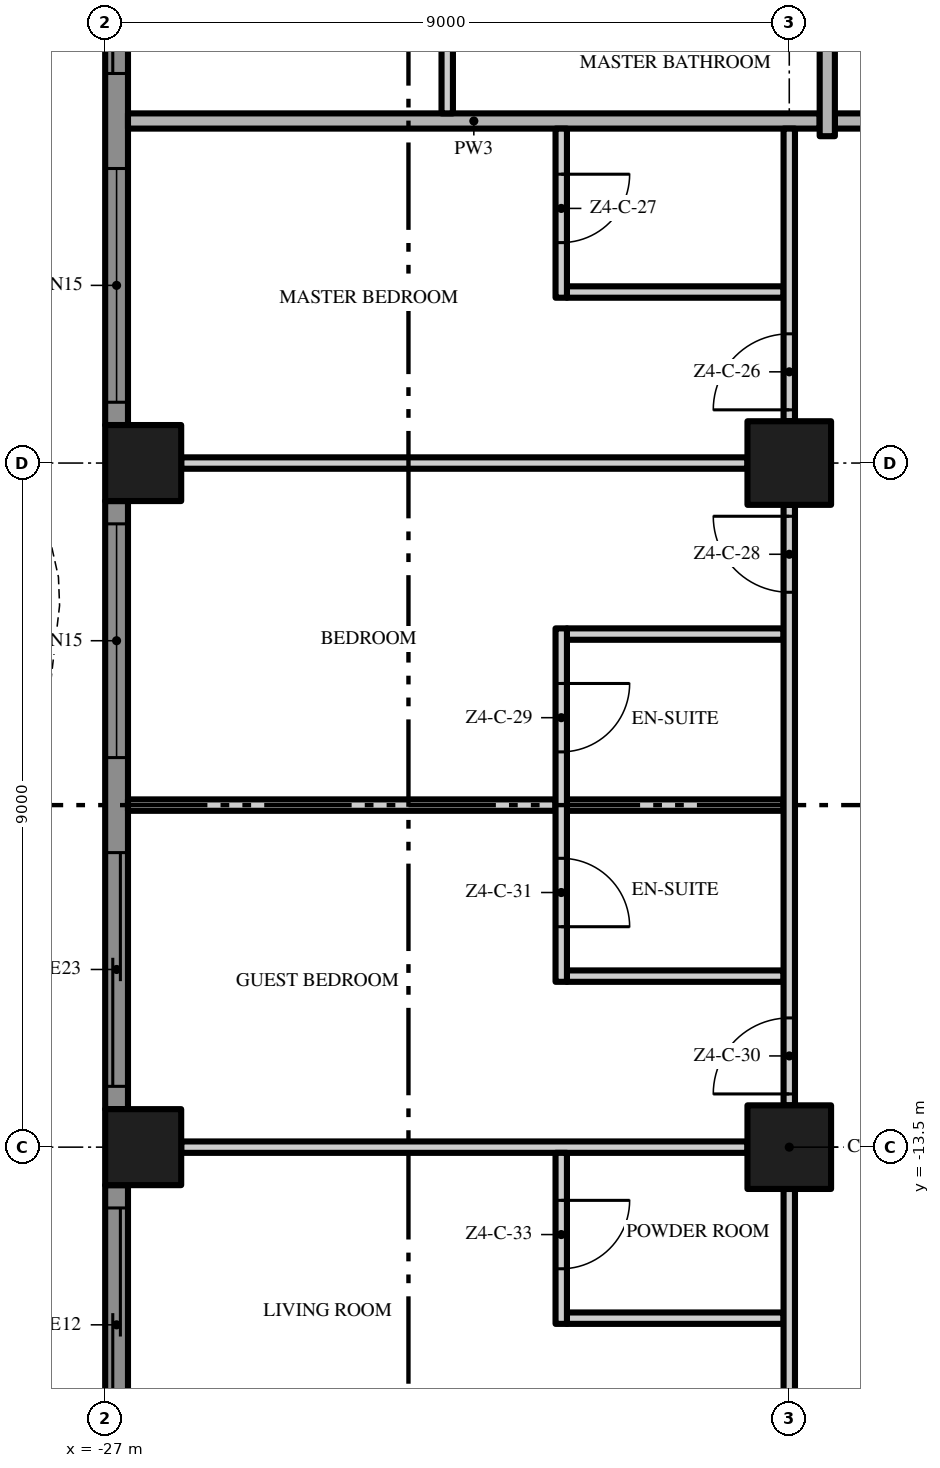
"""IFC4 building model, lengths in metres.
Left out: names, types, materials, properties, quantities, classifications, styles, units other than length and angle.
Written with IfcOpenShell. Run it as: python <this file> out.ifc"""

import sys

from ifc_helpers import new_model, si_unit, direction, frame, frame_2d, origin, origin_2d, place, context, subcontext, project, spatial, polyline, rectangle, outline, extrude, element, fill, save


model = new_model("IFC4")
c1 = context("Model", 3, precision=1e-05, world=origin(), true_north=direction((0.0, 1.0)))
c2 = subcontext(c1, "Body", "Model", "MODEL_VIEW")
j1 = project(units=[si_unit("LENGTHUNIT", "METRE"), si_unit("PLANEANGLEUNIT", "RADIAN")], contexts=[c1])
p1 = place(None, origin())
s1 = spatial("IfcSite", under=j1, at=p1, CompositionType="ELEMENT")
p2 = place(p1, origin())
s2 = spatial("IfcBuilding", under=s1, at=p2, CompositionType="ELEMENT")
p3 = place(p2, frame((0.0, 0.0, 214.8)))
s3 = spatial("IfcBuildingStorey", under=s2, at=p3, CompositionType="ELEMENT", Elevation=214.8)
for number, where, z_axis, x_axis in (
    (1, (-18.0, -13.5, 0.0), (0.0, 0.0, 1.0), (1.0, 0.0, 0.0)),
    (2, (-18.0, -4.5, 0.0), (0.0, 0.0, 1.0), (1.0, 0.0, 0.0)),
):
    element("IfcColumn", number, at=place(p3, frame(where, z_axis=z_axis, x_axis=x_axis)), inside=s3, PredefinedType="COLUMN", context=c2, shape_type="SweptSolid", body=[
        extrude(rectangle(XDim=1.1, YDim=1.1, at=origin_2d()), origin(), (0.0, 0.0, 1.0), 3.5),
    ])
for number, where, z_axis, x_axis in (
    (3, (-26.5, -13.5, 0.0), (0.0, 0.0, 1.0), (1.0, 0.0, 0.0)),
    (4, (-26.5, -4.5, 0.0), (0.0, 0.0, 1.0), (1.0, 0.0, 0.0)),
):
    element("IfcColumn", number, at=place(p3, frame(where, z_axis=z_axis, x_axis=x_axis)), inside=s3, PredefinedType="COLUMN", context=c2, shape_type="SweptSolid", body=[
        extrude(rectangle(XDim=1.0, YDim=1.0, at=origin_2d()), origin(), (0.0, 0.0, 1.0), 3.5),
    ])
p4 = place(p3, frame((-26.85, -4.0, 0.0), z_axis=(0.0, 0.0, 1.0), x_axis=(0.0, 1.0, 0.0)))
e5 = element("IfcWall", 5, at=p4, inside=s3, PredefinedType="SOLIDWALL", context=c2, shape_type="SweptSolid", body=[
    extrude(rectangle(XDim=8.0, YDim=0.3, at=frame_2d((4.0, 0.0))), origin(), (0.0, 0.0, 1.0), 3.5),
])
p5 = place(p4, frame((4.625, 0.0, 0.0)))
e6 = element("IfcOpeningElement", 6, at=p5, cuts=e5, PredefinedType="OPENING", context=c2, shape_type="SweptSolid", body=[
    extrude(rectangle(XDim=3.075, YDim=2.4, at=frame_2d((1.538, 1.2))), frame((0.0, 0.16, 0.0), z_axis=(0.0, -1.0, 0.0), x_axis=(1.0, 0.0, 0.0)), (0.0, 0.0, 1.0), 0.32),
])
p6 = place(p4, frame((0.3, 0.0, 0.45)))
e7 = element("IfcOpeningElement", 7, at=p6, cuts=e5, PredefinedType="OPENING", context=c2, shape_type="SweptSolid", body=[
    extrude(rectangle(XDim=3.075, YDim=2.65, at=frame_2d((1.538, 1.325))), frame((0.0, 0.16, 0.0), z_axis=(0.0, -1.0, 0.0), x_axis=(1.0, 0.0, 0.0)), (0.0, 0.0, 1.0), 0.32),
])
p7 = place(p3, frame((-26.85, -13.0, 0.0), z_axis=(0.0, 0.0, 1.0), x_axis=(0.0, 1.0, 0.0)))
e8 = element("IfcWall", 8, at=p7, inside=s3, PredefinedType="SOLIDWALL", context=c2, shape_type="SweptSolid", body=[
    extrude(rectangle(XDim=8.0, YDim=0.3, at=frame_2d((4.0, 0.0))), origin(), (0.0, 0.0, 1.0), 3.5),
])
p8 = place(p7, frame((4.625, 0.0, 0.45)))
e9 = element("IfcOpeningElement", 9, at=p8, cuts=e8, PredefinedType="OPENING", context=c2, shape_type="SweptSolid", body=[
    extrude(rectangle(XDim=3.075, YDim=2.65, at=frame_2d((1.538, 1.325))), frame((0.0, 0.16, 0.0), z_axis=(0.0, -1.0, 0.0), x_axis=(1.0, 0.0, 0.0)), (0.0, 0.0, 1.0), 0.32),
])
p9 = place(p7, frame((0.3, 0.0, 0.0)))
e10 = element("IfcOpeningElement", 10, at=p9, cuts=e8, PredefinedType="OPENING", context=c2, shape_type="SweptSolid", body=[
    extrude(rectangle(XDim=3.075, YDim=2.4, at=frame_2d((1.538, 1.2))), frame((0.0, 0.16, 0.0), z_axis=(0.0, -1.0, 0.0), x_axis=(1.0, 0.0, 0.0)), (0.0, 0.0, 1.0), 0.32),
])
p10 = place(p3, frame((-26.85, -18.0, 0.0), z_axis=(0.0, 0.0, 1.0), x_axis=(0.0, 1.0, 0.0)))
e11 = element("IfcWall", 11, at=p10, inside=s3, PredefinedType="SOLIDWALL", context=c2, shape_type="SweptSolid", body=[
    extrude(rectangle(XDim=4.0, YDim=0.3, at=frame_2d((2.0, 0.0))), origin(), (0.0, 0.0, 1.0), 3.5),
])
p11 = place(p10, frame((0.625, 0.0, 0.0)))
e12 = element("IfcOpeningElement", 12, at=p11, cuts=e11, PredefinedType="OPENING", context=c2, shape_type="SweptSolid", body=[
    extrude(rectangle(XDim=3.075, YDim=2.4, at=frame_2d((1.538, 1.2))), frame((0.0, 0.16, 0.0), z_axis=(0.0, -1.0, 0.0), x_axis=(1.0, 0.0, 0.0)), (0.0, 0.0, 1.0), 0.32),
])
p12 = place(p3, origin())
e13 = element("IfcWall", 13, at=p12, inside=s3, PredefinedType="USERDEFINED", context=c2, shape_type="SweptSolid", body=[
    extrude(outline(polyline([(-29.649, 18.0), (-29.985, 16.5), (-30.0, 16.125), (-29.869, 15.0), (-29.345, 13.5), (-28.612, 12.0), (-27.951, 10.5), (-27.615, 9.0), (-27.6, 8.625), (-27.731, 7.5), (-28.255, 6.0), (-28.988, 4.5), (-29.649, 3.0), (-29.985, 1.5), (-30.0, 1.125), (-29.869, 0.0), (-29.345, -1.5), (-28.612, -3.0), (-27.951, -4.5), (-27.615, -6.0), (-27.6, -6.375), (-27.731, -7.5), (-28.255, -9.0), (-28.988, -10.5), (-29.649, -12.0), (-29.985, -13.5), (-30.0, -13.875), (-29.869, -15.0), (-29.345, -16.5), (-28.612, -18.0), (-28.388, -17.89), (-29.114, -16.404), (-29.624, -14.944), (-29.749, -13.865), (-29.736, -13.533), (-29.41, -12.079), (-28.761, -10.605), (-28.024, -9.096), (-27.486, -7.556), (-27.349, -6.385), (-27.366, -5.967), (-27.713, -4.421), (-28.385, -2.895), (-29.114, -1.404), (-29.624, 0.056), (-29.749, 1.135), (-29.736, 1.467), (-29.41, 2.921), (-28.761, 4.395), (-28.024, 5.904), (-27.486, 7.444), (-27.349, 8.615), (-27.366, 9.033), (-27.713, 10.579), (-28.385, 12.105), (-29.114, 13.596), (-29.624, 15.056), (-29.749, 16.135), (-29.736, 16.467), (-29.405, 17.945), (-29.649, 18.0)])), origin(), (0.0, 0.0, 1.0), 0.9),
])
p13 = place(p3, frame((-20.925, -15.75, 0.0), z_axis=(0.0, 0.0, 1.0), x_axis=(1.0, 0.0, 0.0)))
e14 = element("IfcWall", 14, at=p13, inside=s3, PredefinedType="PARTITIONING", context=c2, shape_type="SweptSolid", body=[
    extrude(rectangle(XDim=2.85, YDim=0.15, at=frame_2d((1.425, 0.0))), origin(), (0.0, 0.0, 1.0), 3.5),
])
p14 = place(p3, frame((-26.0, -13.5, 0.0), z_axis=(0.0, 0.0, 1.0), x_axis=(1.0, 0.0, 0.0)))
e15 = element("IfcWall", 15, at=p14, inside=s3, PredefinedType="PARTITIONING", context=c2, shape_type="SweptSolid", body=[
    extrude(rectangle(XDim=7.45, YDim=0.15, at=frame_2d((3.725, 0.0))), origin(), (0.0, 0.0, 1.0), 3.5),
])
p15 = place(p3, frame((-20.925, -11.25, 0.0), z_axis=(0.0, 0.0, 1.0), x_axis=(1.0, 0.0, 0.0)))
e16 = element("IfcWall", 16, at=p15, inside=s3, PredefinedType="PARTITIONING", context=c2, shape_type="SweptSolid", body=[
    extrude(rectangle(XDim=2.85, YDim=0.15, at=frame_2d((1.425, 0.0))), origin(), (0.0, 0.0, 1.0), 3.5),
])
p16 = place(p3, frame((-26.7, -9.0, 0.0), z_axis=(0.0, 0.0, 1.0), x_axis=(1.0, 0.0, 0.0)))
e17 = element("IfcWall", 17, at=p16, inside=s3, PredefinedType="PARTITIONING", context=c2, shape_type="SweptSolid", body=[
    extrude(rectangle(XDim=5.625, YDim=0.15, at=frame_2d((2.812, 0.0))), origin(), (0.0, 0.0, 1.0), 3.5),
])
for number, where, z_axis, x_axis in (
    (18, (-20.925, -9.0, 0.0), (0.0, 0.0, 1.0), (1.0, 0.0, 0.0)),
    (19, (-20.925, -6.75, 0.0), (0.0, 0.0, 1.0), (1.0, 0.0, 0.0)),
):
    element("IfcWall", number, at=place(p3, frame(where, z_axis=z_axis, x_axis=x_axis)), inside=s3, PredefinedType="PARTITIONING", context=c2, shape_type="SweptSolid", body=[
        extrude(rectangle(XDim=2.85, YDim=0.15, at=frame_2d((1.425, 0.0))), origin(), (0.0, 0.0, 1.0), 3.5),
    ])
p17 = place(p3, frame((-26.0, -4.5, 0.0), z_axis=(0.0, 0.0, 1.0), x_axis=(1.0, 0.0, 0.0)))
e20 = element("IfcWall", 20, at=p17, inside=s3, PredefinedType="PARTITIONING", context=c2, shape_type="SweptSolid", body=[
    extrude(rectangle(XDim=7.45, YDim=0.15, at=frame_2d((3.725, 0.0))), origin(), (0.0, 0.0, 1.0), 3.5),
])
p18 = place(p3, frame((-20.925, -2.25, 0.0), z_axis=(0.0, 0.0, 1.0), x_axis=(1.0, 0.0, 0.0)))
e21 = element("IfcWall", 21, at=p18, inside=s3, PredefinedType="PARTITIONING", context=c2, shape_type="SweptSolid", body=[
    extrude(rectangle(XDim=2.85, YDim=0.15, at=frame_2d((1.425, 0.0))), origin(), (0.0, 0.0, 1.0), 3.5),
])
p19 = place(p3, frame((-17.4, 0.0, 0.0), z_axis=(0.0, 0.0, 1.0), x_axis=(1.0, 0.0, 0.0)))
e22 = element("IfcWall", 22, at=p19, inside=s3, PredefinedType="PARTITIONING", context=c2, shape_type="SweptSolid", body=[
    extrude(rectangle(XDim=12.8, YDim=0.2, at=frame_2d((6.4, 0.0))), origin(), (0.0, 0.0, 1.0), 3.5),
])
p20 = place(p3, frame((-26.7, 0.0, 0.0), z_axis=(0.0, 0.0, 1.0), x_axis=(1.0, 0.0, 0.0)))
e23 = element("IfcWall", 23, at=p20, inside=s3, PredefinedType="PARTITIONING", context=c2, shape_type="SweptSolid", body=[
    extrude(rectangle(XDim=9.1, YDim=0.2, at=frame_2d((4.55, 0.0))), origin(), (0.0, 0.0, 1.0), 3.5),
])
p21 = place(p3, frame((-22.5, 0.1, 0.0), z_axis=(0.0, 0.0, 1.0), x_axis=(0.0, 1.0, 0.0)))
e24 = element("IfcWall", 24, at=p21, inside=s3, PredefinedType="PARTITIONING", context=c2, shape_type="SweptSolid", body=[
    extrude(rectangle(XDim=17.4, YDim=0.15, at=frame_2d((8.7, 0.0))), origin(), (0.0, 0.0, 1.0), 3.5),
])
p22 = place(p21, frame((1.65, 0.0, 0.0)))
e25 = element("IfcOpeningElement", 25, at=p22, cuts=e24, PredefinedType="OPENING", context=c2, shape_type="SweptSolid", body=[
    extrude(rectangle(XDim=1.0, YDim=2.4, at=frame_2d((0.5, 1.2))), frame((0.0, 0.085, 0.0), z_axis=(0.0, -1.0, 0.0), x_axis=(1.0, 0.0, 0.0)), (0.0, 0.0, 1.0), 0.17),
])
p23 = place(p21, frame((7.25, 0.0, 0.0)))
e26 = element("IfcOpeningElement", 26, at=p23, cuts=e24, PredefinedType="OPENING", context=c2, shape_type="SweptSolid", body=[
    extrude(rectangle(XDim=1.0, YDim=2.4, at=frame_2d((0.5, 1.2))), frame((0.0, 0.085, 0.0), z_axis=(0.0, -1.0, 0.0), x_axis=(1.0, 0.0, 0.0)), (0.0, 0.0, 1.0), 0.17),
])
p24 = place(p21, frame((9.5, 0.0, 0.0)))
e27 = element("IfcOpeningElement", 27, at=p24, cuts=e24, PredefinedType="OPENING", context=c2, shape_type="SweptSolid", body=[
    extrude(rectangle(XDim=1.0, YDim=2.4, at=frame_2d((0.5, 1.2))), frame((0.0, 0.085, 0.0), z_axis=(0.0, -1.0, 0.0), x_axis=(1.0, 0.0, 0.0)), (0.0, 0.0, 1.0), 0.17),
])
p25 = place(p21, frame((16.25, 0.0, 0.0)))
e28 = element("IfcOpeningElement", 28, at=p25, cuts=e24, PredefinedType="OPENING", context=c2, shape_type="SweptSolid", body=[
    extrude(rectangle(XDim=1.0, YDim=2.4, at=frame_2d((0.5, 1.2))), frame((0.0, 0.085, 0.0), z_axis=(0.0, -1.0, 0.0), x_axis=(1.0, 0.0, 0.0)), (0.0, 0.0, 1.0), 0.17),
])
p26 = place(p3, frame((-21.0, -13.575, 0.0), z_axis=(0.0, 0.0, 1.0), x_axis=(0.0, -1.0, 0.0)))
e29 = element("IfcWall", 29, at=p26, inside=s3, PredefinedType="PARTITIONING", context=c2, shape_type="SweptSolid", body=[
    extrude(rectangle(XDim=2.25, YDim=0.15, at=frame_2d((1.125, 0.0))), origin(), (0.0, 0.0, 1.0), 3.5),
])
p27 = place(p26, frame((0.625, 0.0, 0.0)))
e30 = element("IfcOpeningElement", 30, at=p27, cuts=e29, PredefinedType="OPENING", context=c2, shape_type="SweptSolid", body=[
    extrude(rectangle(XDim=0.9, YDim=2.1, at=frame_2d((0.45, 1.05))), frame((0.0, 0.085, 0.0), z_axis=(0.0, -1.0, 0.0), x_axis=(1.0, 0.0, 0.0)), (0.0, 0.0, 1.0), 0.17),
])
p28 = place(p3, frame((-21.0, -6.675, 0.0), z_axis=(0.0, 0.0, 1.0), x_axis=(0.0, -1.0, 0.0)))
e31 = element("IfcWall", 31, at=p28, inside=s3, PredefinedType="PARTITIONING", context=c2, shape_type="SweptSolid", body=[
    extrude(rectangle(XDim=4.65, YDim=0.15, at=frame_2d((2.325, 0.0))), origin(), (0.0, 0.0, 1.0), 3.5),
])
p29 = place(p28, frame((0.725, 0.0, 0.0)))
e32 = element("IfcOpeningElement", 32, at=p29, cuts=e31, PredefinedType="OPENING", context=c2, shape_type="SweptSolid", body=[
    extrude(rectangle(XDim=0.9, YDim=2.1, at=frame_2d((0.45, 1.05))), frame((0.0, 0.085, 0.0), z_axis=(0.0, -1.0, 0.0), x_axis=(1.0, 0.0, 0.0)), (0.0, 0.0, 1.0), 0.17),
])
p30 = place(p28, frame((3.025, 0.0, 0.0)))
e33 = element("IfcOpeningElement", 33, at=p30, cuts=e31, PredefinedType="OPENING", context=c2, shape_type="SweptSolid", body=[
    extrude(rectangle(XDim=0.9, YDim=2.1, at=frame_2d((0.45, 1.05))), frame((0.0, 0.085, 0.0), z_axis=(0.0, -1.0, 0.0), x_axis=(1.0, 0.0, 0.0)), (0.0, 0.0, 1.0), 0.17),
])
p31 = place(p3, frame((-21.0, -0.1, 0.0), z_axis=(0.0, 0.0, 1.0), x_axis=(0.0, -1.0, 0.0)))
e34 = element("IfcWall", 34, at=p31, inside=s3, PredefinedType="PARTITIONING", context=c2, shape_type="SweptSolid", body=[
    extrude(rectangle(XDim=2.225, YDim=0.15, at=frame_2d((1.113, 0.0))), origin(), (0.0, 0.0, 1.0), 3.5),
])
p32 = place(p31, frame((0.6, 0.0, 0.0)))
e35 = element("IfcOpeningElement", 35, at=p32, cuts=e34, PredefinedType="OPENING", context=c2, shape_type="SweptSolid", body=[
    extrude(rectangle(XDim=0.9, YDim=2.1, at=frame_2d((0.45, 1.05))), frame((0.0, 0.085, 0.0), z_axis=(0.0, -1.0, 0.0), x_axis=(1.0, 0.0, 0.0)), (0.0, 0.0, 1.0), 0.17),
])
p33 = place(p3, frame((-18.0, -21.5, 0.0), z_axis=(0.0, 0.0, 1.0), x_axis=(0.0, 1.0, 0.0)))
e36 = element("IfcWall", 36, at=p33, inside=s3, PredefinedType="PARTITIONING", context=c2, shape_type="SweptSolid", body=[
    extrude(rectangle(XDim=7.45, YDim=0.15, at=frame_2d((3.725, 0.0))), origin(), (0.0, 0.0, 1.0), 3.5),
])
p34 = place(p33, frame((1.45, 0.0, 0.0)))
e37 = element("IfcOpeningElement", 37, at=p34, cuts=e36, PredefinedType="OPENING", context=c2, shape_type="SweptSolid", body=[
    extrude(rectangle(XDim=1.8, YDim=2.4, at=frame_2d((0.9, 1.2))), frame((0.0, 0.085, 0.0), z_axis=(0.0, -1.0, 0.0), x_axis=(1.0, 0.0, 0.0)), (0.0, 0.0, 1.0), 0.17),
])
p35 = place(p3, frame((-18.0, -12.95, 0.0), z_axis=(0.0, 0.0, 1.0), x_axis=(0.0, 1.0, 0.0)))
e38 = element("IfcWall", 38, at=p35, inside=s3, PredefinedType="PARTITIONING", context=c2, shape_type="SweptSolid", body=[
    extrude(rectangle(XDim=7.9, YDim=0.15, at=frame_2d((3.95, 0.0))), origin(), (0.0, 0.0, 1.0), 3.5),
])
p36 = place(p35, frame((6.75, 0.0, 0.0)))
e39 = element("IfcOpeningElement", 39, at=p36, cuts=e38, PredefinedType="OPENING", context=c2, shape_type="SweptSolid", body=[
    extrude(rectangle(XDim=1.0, YDim=2.4, at=frame_2d((0.5, 1.2))), frame((0.0, 0.085, 0.0), z_axis=(0.0, -1.0, 0.0), x_axis=(1.0, 0.0, 0.0)), (0.0, 0.0, 1.0), 0.17),
])
p37 = place(p35, frame((0.15, 0.0, 0.0)))
e40 = element("IfcOpeningElement", 40, at=p37, cuts=e38, PredefinedType="OPENING", context=c2, shape_type="SweptSolid", body=[
    extrude(rectangle(XDim=1.0, YDim=2.4, at=frame_2d((0.5, 1.2))), frame((0.0, 0.085, 0.0), z_axis=(0.0, -1.0, 0.0), x_axis=(1.0, 0.0, 0.0)), (0.0, 0.0, 1.0), 0.17),
])
p38 = place(p3, frame((-18.0, -3.95, 0.0), z_axis=(0.0, 0.0, 1.0), x_axis=(0.0, 1.0, 0.0)))
e41 = element("IfcWall", 41, at=p38, inside=s3, PredefinedType="PARTITIONING", context=c2, shape_type="SweptSolid", body=[
    extrude(rectangle(XDim=3.85, YDim=0.15, at=frame_2d((1.925, 0.0))), origin(), (0.0, 0.0, 1.0), 3.5),
])
p39 = place(p38, frame((0.15, 0.0, 0.0)))
e42 = element("IfcOpeningElement", 42, at=p39, cuts=e41, PredefinedType="OPENING", context=c2, shape_type="SweptSolid", body=[
    extrude(rectangle(XDim=1.0, YDim=2.4, at=frame_2d((0.5, 1.2))), frame((0.0, 0.085, 0.0), z_axis=(0.0, -1.0, 0.0), x_axis=(1.0, 0.0, 0.0)), (0.0, 0.0, 1.0), 0.17),
])
p40 = place(p3, frame((-17.5, -0.2, 0.0), z_axis=(0.0, 0.0, 1.0), x_axis=(0.0, 1.0, 0.0)))
e43 = element("IfcWall", 43, at=p40, inside=s3, PredefinedType="PARTITIONING", context=c2, shape_type="SweptSolid", body=[
    extrude(rectangle(XDim=4.15, YDim=0.2, at=frame_2d((2.075, 0.0))), origin(), (0.0, 0.0, 1.0), 3.5),
])
p41 = place(p5, origin())
e44 = element("IfcDoor", 44, at=p41, inside=s3, OperationType="SINGLE_SWING_LEFT", PredefinedType="DOOR", context=c2, shape_type="SweptSolid", body=[
    extrude(rectangle(XDim=3.075, YDim=2.4, at=frame_2d((1.538, 1.2))), frame((0.0, 0.025, 0.0), z_axis=(0.0, -1.0, 0.0), x_axis=(1.0, 0.0, 0.0)), (0.0, 0.0, 1.0), 0.05),
])
fill(e6, e44)
p42 = place(p6, origin())
e45 = element("IfcWindow", 45, at=p42, inside=s3, PartitioningType="SINGLE_PANEL", PredefinedType="WINDOW", context=c2, shape_type="SweptSolid", body=[
    extrude(rectangle(XDim=3.075, YDim=2.65, at=frame_2d((1.538, 1.325))), frame((0.0, 0.03, 0.0), z_axis=(0.0, -1.0, 0.0), x_axis=(1.0, 0.0, 0.0)), (0.0, 0.0, 1.0), 0.06),
])
fill(e7, e45)
p43 = place(p8, origin())
e46 = element("IfcWindow", 46, at=p43, inside=s3, PartitioningType="SINGLE_PANEL", PredefinedType="WINDOW", context=c2, shape_type="SweptSolid", body=[
    extrude(rectangle(XDim=3.075, YDim=2.65, at=frame_2d((1.538, 1.325))), frame((0.0, 0.03, 0.0), z_axis=(0.0, -1.0, 0.0), x_axis=(1.0, 0.0, 0.0)), (0.0, 0.0, 1.0), 0.06),
])
fill(e9, e46)
p44 = place(p9, origin())
e47 = element("IfcDoor", 47, at=p44, inside=s3, OperationType="SINGLE_SWING_LEFT", PredefinedType="DOOR", context=c2, shape_type="SweptSolid", body=[
    extrude(rectangle(XDim=3.075, YDim=2.4, at=frame_2d((1.538, 1.2))), frame((0.0, 0.025, 0.0), z_axis=(0.0, -1.0, 0.0), x_axis=(1.0, 0.0, 0.0)), (0.0, 0.0, 1.0), 0.05),
])
fill(e10, e47)
p45 = place(p11, origin())
e48 = element("IfcDoor", 48, at=p45, inside=s3, OperationType="SINGLE_SWING_LEFT", PredefinedType="DOOR", context=c2, shape_type="SweptSolid", body=[
    extrude(rectangle(XDim=3.075, YDim=2.4, at=frame_2d((1.538, 1.2))), frame((0.0, 0.025, 0.0), z_axis=(0.0, -1.0, 0.0), x_axis=(1.0, 0.0, 0.0)), (0.0, 0.0, 1.0), 0.05),
])
fill(e12, e48)
p46 = place(p39, origin())
e49 = element("IfcDoor", 49, at=p46, inside=s3, OperationType="SINGLE_SWING_LEFT", PredefinedType="DOOR", context=c2, shape_type="SweptSolid", body=[
    extrude(rectangle(XDim=1.0, YDim=2.4, at=frame_2d((0.5, 1.2))), frame((0.0, 0.025, 0.0), z_axis=(0.0, -1.0, 0.0), x_axis=(1.0, 0.0, 0.0)), (0.0, 0.0, 1.0), 0.05),
])
fill(e42, e49)
p47 = place(p32, origin())
e50 = element("IfcDoor", 50, at=p47, inside=s3, OperationType="SINGLE_SWING_LEFT", PredefinedType="DOOR", context=c2, shape_type="SweptSolid", body=[
    extrude(rectangle(XDim=0.9, YDim=2.1, at=frame_2d((0.45, 1.05))), frame((0.0, 0.025, 0.0), z_axis=(0.0, -1.0, 0.0), x_axis=(1.0, 0.0, 0.0)), (0.0, 0.0, 1.0), 0.05),
])
fill(e35, e50)
p48 = place(p36, origin())
e51 = element("IfcDoor", 51, at=p48, inside=s3, OperationType="SINGLE_SWING_RIGHT", PredefinedType="DOOR", context=c2, shape_type="SweptSolid", body=[
    extrude(rectangle(XDim=1.0, YDim=2.4, at=frame_2d((0.5, 1.2))), frame((0.0, 0.025, 0.0), z_axis=(0.0, -1.0, 0.0), x_axis=(1.0, 0.0, 0.0)), (0.0, 0.0, 1.0), 0.05),
])
fill(e39, e51)
p49 = place(p29, origin())
e52 = element("IfcDoor", 52, at=p49, inside=s3, OperationType="SINGLE_SWING_LEFT", PredefinedType="DOOR", context=c2, shape_type="SweptSolid", body=[
    extrude(rectangle(XDim=0.9, YDim=2.1, at=frame_2d((0.45, 1.05))), frame((0.0, 0.025, 0.0), z_axis=(0.0, -1.0, 0.0), x_axis=(1.0, 0.0, 0.0)), (0.0, 0.0, 1.0), 0.05),
])
fill(e32, e52)
p50 = place(p37, origin())
e53 = element("IfcDoor", 53, at=p50, inside=s3, OperationType="SINGLE_SWING_LEFT", PredefinedType="DOOR", context=c2, shape_type="SweptSolid", body=[
    extrude(rectangle(XDim=1.0, YDim=2.4, at=frame_2d((0.5, 1.2))), frame((0.0, 0.025, 0.0), z_axis=(0.0, -1.0, 0.0), x_axis=(1.0, 0.0, 0.0)), (0.0, 0.0, 1.0), 0.05),
])
fill(e40, e53)
p51 = place(p30, origin())
e54 = element("IfcDoor", 54, at=p51, inside=s3, OperationType="SINGLE_SWING_RIGHT", PredefinedType="DOOR", context=c2, shape_type="SweptSolid", body=[
    extrude(rectangle(XDim=0.9, YDim=2.1, at=frame_2d((0.45, 1.05))), frame((0.0, 0.025, 0.0), z_axis=(0.0, -1.0, 0.0), x_axis=(1.0, 0.0, 0.0)), (0.0, 0.0, 1.0), 0.05),
])
fill(e33, e54)
p52 = place(p27, origin())
e55 = element("IfcDoor", 55, at=p52, inside=s3, OperationType="SINGLE_SWING_LEFT", PredefinedType="DOOR", context=c2, shape_type="SweptSolid", body=[
    extrude(rectangle(XDim=0.9, YDim=2.1, at=frame_2d((0.45, 1.05))), frame((0.0, 0.025, 0.0), z_axis=(0.0, -1.0, 0.0), x_axis=(1.0, 0.0, 0.0)), (0.0, 0.0, 1.0), 0.05),
])
fill(e30, e55)
save(model, sys.argv[1])
